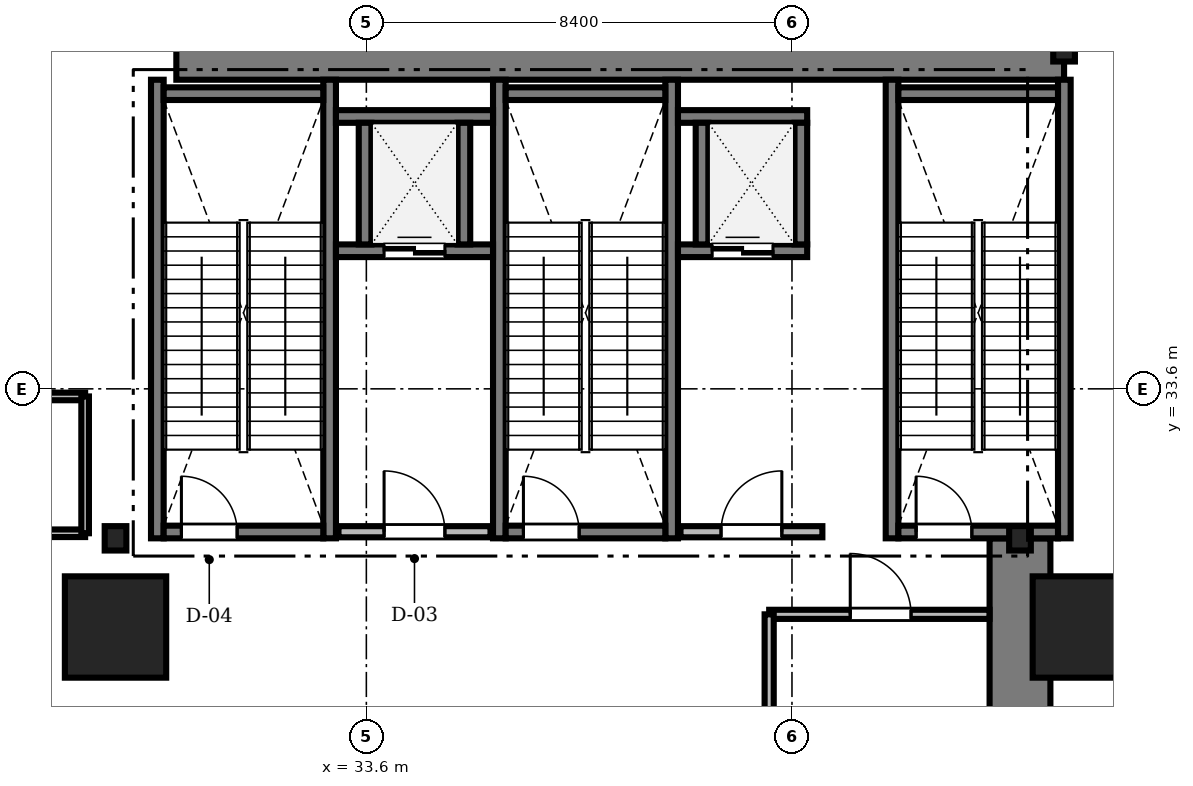
"""IFC4 building model, lengths in metres.
Left out: names, types, materials, properties, quantities, classifications, styles, units other than length and angle.
Written with IfcOpenShell. Run it as: python <this file> out.ifc"""

import sys

from ifc_helpers import new_model, si_unit, direction, frame, frame_2d, origin, origin_2d, place, context, subcontext, project, spatial, rectangle, i_section, extrude, source, transform, mapped, element, fill, save


model = new_model("IFC4")
c1 = context("Model", 3, precision=1e-05, world=origin(), true_north=direction((0.0, 1.0)))
c2 = subcontext(c1, "Body", "Model", "MODEL_VIEW")
j1 = project(units=[si_unit("LENGTHUNIT", "METRE"), si_unit("PLANEANGLEUNIT", "RADIAN")], contexts=[c1])
p1 = place(None, origin())
s1 = spatial("IfcSite", under=j1, at=p1, CompositionType="ELEMENT")
p2 = place(p1, origin())
s2 = spatial("IfcBuilding", under=s1, at=p2, CompositionType="ELEMENT")
p3 = place(p2, frame((0.0, 0.0, -6.0)))
s3 = spatial("IfcBuildingStorey", under=s2, at=p3, CompositionType="ELEMENT", Elevation=-6.0)
m1 = source(origin(), c2, "Body", "SweptSolid", [
    extrude(rectangle(XDim=17.52, YDim=1.2, at=frame_2d((8.76, 0.0))), origin(), (0.0, 0.0, 1.0), 5.6),
])
p4 = place(p3, frame((29.85, 40.3, 0.0), z_axis=(0.0, 0.0, 1.0), x_axis=(1.0, 0.0, 0.0)))
e1 = element("IfcWall", 1, at=p4, inside=s3, PredefinedType="SHEAR", context=c2, shape_type="MappedRepresentation", body=[
    mapped(m1, transform((0.0, 0.0, 0.0), scale=1.0)),
])
m2 = source(origin(), c2, "Body", "SweptSolid", [
    extrude(rectangle(XDim=13.15, YDim=1.2, at=frame_2d((6.575, 0.0))), origin(), (0.0, 0.0, 1.0), 5.6),
])
p5 = place(p3, frame((46.5, 17.5, 0.0), z_axis=(0.0, 0.0, 1.0), x_axis=(0.0, 1.0, 0.0)))
e2 = element("IfcWall", 2, at=p5, inside=s3, PredefinedType="SHEAR", context=c2, shape_type="MappedRepresentation", body=[
    mapped(m2, transform((0.0, 0.0, 0.0), scale=1.0)),
])
m3 = source(origin(), c2, "Body", "SweptSolid", [
    extrude(i_section(OverallWidth=0.428, OverallDepth=0.481, WebThickness=0.04, FlangeThickness=0.063, FilletRadius=0.015, at=origin_2d()), origin(), (0.0, 0.0, 1.0), 5.6),
])
for number, where, z_axis, x_axis in (
    (3, (28.65, 30.65, 0.0), (0.0, 0.0, 1.0), (1.0, 0.0, 0.0)),
    (4, (46.5, 30.65, 0.0), (0.0, 0.0, 1.0), (1.0, 0.0, 0.0)),
    (5, (47.37, 40.3, 0.0), (0.0, 0.0, 1.0), (1.0, 0.0, 0.0)),
):
    element("IfcColumn", number, at=place(p3, frame(where, z_axis=z_axis, x_axis=x_axis)), inside=s3, PredefinedType="COLUMN", context=c2, shape_type="MappedRepresentation", body=[
        mapped(m3, transform((0.0, 0.0, 0.0), scale=1.0)),
    ])
m4 = source(origin(), c2, "Body", "SweptSolid", [
    extrude(rectangle(XDim=2.0, YDim=2.0, at=origin_2d()), origin(), (0.0, 0.0, 1.0), 5.6),
])
for number, where, z_axis, x_axis in (
    (6, (28.65, 28.9, 0.0), (0.0, 0.0, 1.0), (1.0, 0.0, 0.0)),
    (7, (47.75, 28.9, 0.0), (0.0, 0.0, 1.0), (1.0, 0.0, 0.0)),
):
    element("IfcColumn", number, at=place(p3, frame(where, z_axis=z_axis, x_axis=x_axis)), inside=s3, PredefinedType="COLUMN", context=c2, shape_type="MappedRepresentation", body=[
        mapped(m4, transform((0.0, 0.0, 0.0), scale=1.0)),
    ])
m5 = source(origin(), c2, "Body", "SweptSolid", [
    extrude(rectangle(XDim=9.05, YDim=0.25, at=frame_2d((4.525, 0.0))), origin(), (0.0, 0.0, 1.0), 5.8),
])
for number, where, z_axis, x_axis in (
    (8, (29.475, 30.65, 0.0), (0.0, 0.0, 1.0), (0.0, 1.0, 0.0)),
    (9, (32.875, 30.65, 0.0), (0.0, 0.0, 1.0), (0.0, 1.0, 0.0)),
):
    element("IfcWall", number, at=place(p3, frame(where, z_axis=z_axis, x_axis=x_axis)), inside=s3, PredefinedType="SOLIDWALL", context=c2, shape_type="MappedRepresentation", body=[
        mapped(m5, transform((0.0, 0.0, 0.0), scale=1.0)),
    ])
m6 = source(origin(), c2, "Body", "SweptSolid", [
    extrude(rectangle(XDim=3.15, YDim=0.25, at=frame_2d((1.575, 0.0))), origin(), (0.0, 0.0, 1.0), 5.8),
])
p6 = place(p3, frame((29.6, 39.425, 0.0), z_axis=(0.0, 0.0, 1.0), x_axis=(1.0, 0.0, 0.0)))
e10 = element("IfcWall", 10, at=p6, inside=s3, PredefinedType="SOLIDWALL", context=c2, shape_type="MappedRepresentation", body=[
    mapped(m6, transform((0.0, 0.0, 0.0), scale=1.0)),
])
p7 = place(p3, frame((29.6, 30.775, 0.0), z_axis=(0.0, 0.0, 1.0), x_axis=(1.0, 0.0, 0.0)))
e11 = element("IfcWall", 11, at=p7, inside=s3, PredefinedType="SOLIDWALL", context=c2, shape_type="MappedRepresentation", body=[
    mapped(m6, transform((0.0, 0.0, 0.0), scale=1.0)),
])
m7 = source(origin(), c2, "Body", "SweptSolid", [
    extrude(rectangle(XDim=1.1, YDim=2.2, at=frame_2d((0.55, 1.1))), frame((0.0, 0.135, 0.0), z_axis=(0.0, -1.0, 0.0), x_axis=(1.0, 0.0, 0.0)), (0.0, 0.0, 1.0), 0.27),
])
p8 = place(p7, frame((0.35, 0.0, 0.0)))
e12 = element("IfcOpeningElement", 12, at=p8, cuts=e11, PredefinedType="OPENING", context=c2, shape_type="MappedRepresentation", body=[
    mapped(m7, transform((0.0, 0.0, 0.0), scale=1.0)),
])
for number, where, z_axis, x_axis in (
    (13, (36.225, 30.65, 0.0), (0.0, 0.0, 1.0), (0.0, 1.0, 0.0)),
    (14, (39.625, 30.65, 0.0), (0.0, 0.0, 1.0), (0.0, 1.0, 0.0)),
):
    element("IfcWall", number, at=place(p3, frame(where, z_axis=z_axis, x_axis=x_axis)), inside=s3, PredefinedType="SOLIDWALL", context=c2, shape_type="MappedRepresentation", body=[
        mapped(m5, transform((0.0, 0.0, 0.0), scale=1.0)),
    ])
p9 = place(p3, frame((36.35, 39.425, 0.0), z_axis=(0.0, 0.0, 1.0), x_axis=(1.0, 0.0, 0.0)))
e15 = element("IfcWall", 15, at=p9, inside=s3, PredefinedType="SOLIDWALL", context=c2, shape_type="MappedRepresentation", body=[
    mapped(m6, transform((0.0, 0.0, 0.0), scale=1.0)),
])
p10 = place(p3, frame((36.35, 30.775, 0.0), z_axis=(0.0, 0.0, 1.0), x_axis=(1.0, 0.0, 0.0)))
e16 = element("IfcWall", 16, at=p10, inside=s3, PredefinedType="SOLIDWALL", context=c2, shape_type="MappedRepresentation", body=[
    mapped(m6, transform((0.0, 0.0, 0.0), scale=1.0)),
])
p11 = place(p10, frame((0.35, 0.0, 0.0)))
e17 = element("IfcOpeningElement", 17, at=p11, cuts=e16, PredefinedType="OPENING", context=c2, shape_type="MappedRepresentation", body=[
    mapped(m7, transform((0.0, 0.0, 0.0), scale=1.0)),
])
for number, where, z_axis, x_axis in (
    (18, (43.975, 30.65, 0.0), (0.0, 0.0, 1.0), (0.0, 1.0, 0.0)),
    (19, (47.375, 30.65, 0.0), (0.0, 0.0, 1.0), (0.0, 1.0, 0.0)),
):
    element("IfcWall", number, at=place(p3, frame(where, z_axis=z_axis, x_axis=x_axis)), inside=s3, PredefinedType="SOLIDWALL", context=c2, shape_type="MappedRepresentation", body=[
        mapped(m5, transform((0.0, 0.0, 0.0), scale=1.0)),
    ])
p12 = place(p3, frame((44.1, 39.425, 0.0), z_axis=(0.0, 0.0, 1.0), x_axis=(1.0, 0.0, 0.0)))
e20 = element("IfcWall", 20, at=p12, inside=s3, PredefinedType="SOLIDWALL", context=c2, shape_type="MappedRepresentation", body=[
    mapped(m6, transform((0.0, 0.0, 0.0), scale=1.0)),
])
p13 = place(p3, frame((44.1, 30.775, 0.0), z_axis=(0.0, 0.0, 1.0), x_axis=(1.0, 0.0, 0.0)))
e21 = element("IfcWall", 21, at=p13, inside=s3, PredefinedType="SOLIDWALL", context=c2, shape_type="MappedRepresentation", body=[
    mapped(m6, transform((0.0, 0.0, 0.0), scale=1.0)),
])
p14 = place(p13, frame((0.35, 0.0, 0.0)))
e22 = element("IfcOpeningElement", 22, at=p14, cuts=e21, PredefinedType="OPENING", context=c2, shape_type="MappedRepresentation", body=[
    mapped(m7, transform((0.0, 0.0, 0.0), scale=1.0)),
])
m8 = source(origin(), c2, "Body", "SweptSolid", [
    extrude(rectangle(XDim=3.0, YDim=0.22, at=frame_2d((1.5, 0.0))), origin(), (0.0, 0.0, 1.0), 5.6),
])
p15 = place(p3, frame((33.05, 30.78, 0.0), z_axis=(0.0, 0.0, 1.0), x_axis=(1.0, 0.0, 0.0)))
e23 = element("IfcWall", 23, at=p15, inside=s3, PredefinedType="SOLIDWALL", context=c2, shape_type="MappedRepresentation", body=[
    mapped(m8, transform((0.0, 0.0, 0.0), scale=1.0)),
])
m9 = source(origin(), c2, "Body", "SweptSolid", [
    extrude(rectangle(XDim=1.2, YDim=2.2, at=frame_2d((0.6, 1.1))), frame((0.0, 0.12, 0.0), z_axis=(0.0, -1.0, 0.0), x_axis=(1.0, 0.0, 0.0)), (0.0, 0.0, 1.0), 0.24),
])
p16 = place(p15, frame((0.9, 0.0, 0.0)))
e24 = element("IfcOpeningElement", 24, at=p16, cuts=e23, PredefinedType="OPENING", context=c2, shape_type="MappedRepresentation", body=[
    mapped(m9, transform((0.0, 0.0, 0.0), scale=1.0)),
])
m10 = source(origin(), c2, "Body", "SweptSolid", [
    extrude(rectangle(XDim=2.8, YDim=0.22, at=frame_2d((1.4, 0.0))), origin(), (0.0, 0.0, 1.0), 5.6),
])
p17 = place(p3, frame((39.8, 30.78, 0.0), z_axis=(0.0, 0.0, 1.0), x_axis=(1.0, 0.0, 0.0)))
e25 = element("IfcWall", 25, at=p17, inside=s3, PredefinedType="SOLIDWALL", context=c2, shape_type="MappedRepresentation", body=[
    mapped(m10, transform((0.0, 0.0, 0.0), scale=1.0)),
])
p18 = place(p17, frame((0.8, 0.0, 0.0)))
e26 = element("IfcOpeningElement", 26, at=p18, cuts=e25, PredefinedType="OPENING", context=c2, shape_type="MappedRepresentation", body=[
    mapped(m9, transform((0.0, 0.0, 0.0), scale=1.0)),
])
m11 = source(origin(), c2, "Body", "SweptSolid", [
    extrude(rectangle(XDim=3.1, YDim=0.25, at=frame_2d((1.55, 0.0))), origin(), (0.0, 0.0, 1.0), 5.6),
])
p19 = place(p3, frame((33.0, 36.325, 0.0), z_axis=(0.0, 0.0, 1.0), x_axis=(1.0, 0.0, 0.0)))
e27 = element("IfcWall", 27, at=p19, inside=s3, PredefinedType="SOLIDWALL", context=c2, shape_type="MappedRepresentation", body=[
    mapped(m11, transform((0.0, 0.0, 0.0), scale=1.0)),
])
m12 = source(origin(), c2, "Body", "SweptSolid", [
    extrude(rectangle(XDim=1.2, YDim=2.25, at=frame_2d((0.6, 1.125))), frame((0.0, 0.135, 0.0), z_axis=(0.0, -1.0, 0.0), x_axis=(1.0, 0.0, 0.0)), (0.0, 0.0, 1.0), 0.27),
])
p20 = place(p19, frame((0.95, 0.0, 0.0)))
e28 = element("IfcOpeningElement", 28, at=p20, cuts=e27, PredefinedType="OPENING", context=c2, shape_type="MappedRepresentation", body=[
    mapped(m12, transform((0.0, 0.0, 0.0), scale=1.0)),
])
p21 = place(p3, frame((33.0, 38.975, 0.0), z_axis=(0.0, 0.0, 1.0), x_axis=(1.0, 0.0, 0.0)))
e29 = element("IfcWall", 29, at=p21, inside=s3, PredefinedType="SOLIDWALL", context=c2, shape_type="MappedRepresentation", body=[
    mapped(m11, transform((0.0, 0.0, 0.0), scale=1.0)),
])
m13 = source(origin(), c2, "Body", "SweptSolid", [
    extrude(rectangle(XDim=2.4, YDim=0.25, at=frame_2d((1.2, 0.0))), origin(), (0.0, 0.0, 1.0), 5.6),
])
for number, where, z_axis, x_axis in (
    (30, (33.575, 36.45, 0.0), (0.0, 0.0, 1.0), (0.0, 1.0, 0.0)),
    (31, (35.525, 36.45, 0.0), (0.0, 0.0, 1.0), (0.0, 1.0, 0.0)),
):
    element("IfcWall", number, at=place(p3, frame(where, z_axis=z_axis, x_axis=x_axis)), inside=s3, PredefinedType="SOLIDWALL", context=c2, shape_type="MappedRepresentation", body=[
        mapped(m13, transform((0.0, 0.0, 0.0), scale=1.0)),
    ])
m14 = source(origin(), c2, "Body", "SweptSolid", [
    extrude(rectangle(XDim=2.55, YDim=0.25, at=frame_2d((1.275, 0.0))), origin(), (0.0, 0.0, 1.0), 5.6),
])
p22 = place(p3, frame((39.75, 36.325, 0.0), z_axis=(0.0, 0.0, 1.0), x_axis=(1.0, 0.0, 0.0)))
e32 = element("IfcWall", 32, at=p22, inside=s3, PredefinedType="SOLIDWALL", context=c2, shape_type="MappedRepresentation", body=[
    mapped(m14, transform((0.0, 0.0, 0.0), scale=1.0)),
])
p23 = place(p22, frame((0.675, 0.0, 0.0)))
e33 = element("IfcOpeningElement", 33, at=p23, cuts=e32, PredefinedType="OPENING", context=c2, shape_type="MappedRepresentation", body=[
    mapped(m12, transform((0.0, 0.0, 0.0), scale=1.0)),
])
p24 = place(p3, frame((39.75, 38.975, 0.0), z_axis=(0.0, 0.0, 1.0), x_axis=(1.0, 0.0, 0.0)))
e34 = element("IfcWall", 34, at=p24, inside=s3, PredefinedType="SOLIDWALL", context=c2, shape_type="MappedRepresentation", body=[
    mapped(m14, transform((0.0, 0.0, 0.0), scale=1.0)),
])
for number, where, z_axis, x_axis in (
    (35, (40.225, 36.45, 0.0), (0.0, 0.0, 1.0), (0.0, 1.0, 0.0)),
    (36, (42.175, 36.45, 0.0), (0.0, 0.0, 1.0), (0.0, 1.0, 0.0)),
):
    element("IfcWall", number, at=place(p3, frame(where, z_axis=z_axis, x_axis=x_axis)), inside=s3, PredefinedType="SOLIDWALL", context=c2, shape_type="MappedRepresentation", body=[
        mapped(m13, transform((0.0, 0.0, 0.0), scale=1.0)),
    ])
m15 = source(origin(), c2, "Body", "SweptSolid", [
    extrude(rectangle(XDim=4.348, YDim=0.18, at=frame_2d((2.174, 0.0))), origin(), (0.0, 0.0, 1.0), 5.6),
])
p25 = place(p3, frame((41.55, 29.15, 0.0), z_axis=(0.0, 0.0, 1.0), x_axis=(1.0, 0.0, 0.0)))
e37 = element("IfcWall", 37, at=p25, inside=s3, PredefinedType="PARTITIONING", context=c2, shape_type="MappedRepresentation", body=[
    mapped(m15, transform((0.0, 0.0, 0.0), scale=1.0)),
])
m16 = source(origin(), c2, "Body", "SweptSolid", [
    extrude(rectangle(XDim=1.2, YDim=2.2, at=frame_2d((0.6, 1.1))), frame((0.0, 0.1, 0.0), z_axis=(0.0, -1.0, 0.0), x_axis=(1.0, 0.0, 0.0)), (0.0, 0.0, 1.0), 0.2),
])
p26 = place(p25, frame((1.6, 0.0, 0.0)))
e38 = element("IfcOpeningElement", 38, at=p26, cuts=e37, PredefinedType="OPENING", context=c2, shape_type="MappedRepresentation", body=[
    mapped(m16, transform((0.0, 0.0, 0.0), scale=1.0)),
])
m17 = source(origin(), c2, "Body", "SweptSolid", [
    extrude(rectangle(XDim=3.95, YDim=0.15, at=frame_2d((1.975, 0.0))), origin(), (0.0, 0.0, 1.0), 5.6),
])
p27 = place(p3, frame((24.1, 30.75, 0.0), z_axis=(0.0, 0.0, 1.0), x_axis=(1.0, 0.0, 0.0)))
e39 = element("IfcWall", 39, at=p27, inside=s3, PredefinedType="PARTITIONING", context=c2, shape_type="MappedRepresentation", body=[
    mapped(m17, transform((0.0, 0.0, 0.0), scale=1.0)),
])
m18 = source(origin(), c2, "Body", "SweptSolid", [
    extrude(rectangle(XDim=0.92, YDim=2.1, at=frame_2d((0.46, 1.05))), frame((0.0, 0.085, 0.0), z_axis=(0.0, -1.0, 0.0), x_axis=(1.0, 0.0, 0.0)), (0.0, 0.0, 1.0), 0.17),
])
p28 = place(p27, frame((1.1, 0.0, 0.0)))
e40 = element("IfcOpeningElement", 40, at=p28, cuts=e39, PredefinedType="OPENING", context=c2, shape_type="MappedRepresentation", body=[
    mapped(m18, transform((0.0, 0.0, 0.0), scale=1.0)),
])
p29 = place(p3, frame((24.1, 33.45, 0.0), z_axis=(0.0, 0.0, 1.0), x_axis=(1.0, 0.0, 0.0)))
e41 = element("IfcWall", 41, at=p29, inside=s3, PredefinedType="PARTITIONING", context=c2, shape_type="MappedRepresentation", body=[
    mapped(m17, transform((0.0, 0.0, 0.0), scale=1.0)),
])
m19 = source(origin(), c2, "Body", "SweptSolid", [
    extrude(rectangle(XDim=2.7, YDim=0.15, at=frame_2d((1.35, 0.0))), origin(), (0.0, 0.0, 1.0), 5.6),
])
p30 = place(p3, frame((28.05, 30.75, 0.0), z_axis=(0.0, 0.0, 1.0), x_axis=(0.0, 1.0, 0.0)))
e42 = element("IfcWall", 42, at=p30, inside=s3, PredefinedType="PARTITIONING", context=c2, shape_type="MappedRepresentation", body=[
    mapped(m19, transform((0.0, 0.0, 0.0), scale=1.0)),
])
m20 = source(origin(), c2, "Body", "SweptSolid", [
    extrude(rectangle(XDim=2.35, YDim=0.18, at=frame_2d((1.175, 0.0))), origin(), (0.0, 0.0, 1.0), 5.6),
])
p31 = place(p3, frame((41.55, 26.8, 0.0), z_axis=(0.0, 0.0, 1.0), x_axis=(0.0, 1.0, 0.0)))
e43 = element("IfcWall", 43, at=p31, inside=s3, PredefinedType="PARTITIONING", context=c2, shape_type="MappedRepresentation", body=[
    mapped(m20, transform((0.0, 0.0, 0.0), scale=1.0)),
])
m21 = source(origin(), c2, "Body", "SweptSolid", [
    extrude(rectangle(XDim=1.1, YDim=2.2, at=frame_2d((0.55, 1.1))), frame((0.0, 0.025, 0.0), z_axis=(0.0, -1.0, 0.0), x_axis=(1.0, 0.0, 0.0)), (0.0, 0.0, 1.0), 0.05),
])
p32 = place(p8, origin())
e44 = element("IfcDoor", 44, at=p32, inside=s3, OperationType="SINGLE_SWING_LEFT", PredefinedType="DOOR", context=c2, shape_type="MappedRepresentation", body=[
    mapped(m21, transform((0.0, 0.0, 0.0), scale=1.0)),
])
fill(e12, e44)
p33 = place(p11, origin())
e45 = element("IfcDoor", 45, at=p33, inside=s3, OperationType="SINGLE_SWING_LEFT", PredefinedType="DOOR", context=c2, shape_type="MappedRepresentation", body=[
    mapped(m21, transform((0.0, 0.0, 0.0), scale=1.0)),
])
fill(e17, e45)
p34 = place(p14, origin())
e46 = element("IfcDoor", 46, at=p34, inside=s3, OperationType="SINGLE_SWING_LEFT", PredefinedType="DOOR", context=c2, shape_type="MappedRepresentation", body=[
    mapped(m21, transform((0.0, 0.0, 0.0), scale=1.0)),
])
fill(e22, e46)
m22 = source(origin(), c2, "Body", "SweptSolid", [
    extrude(rectangle(XDim=1.2, YDim=2.2, at=frame_2d((0.6, 1.1))), frame((0.0, 0.025, 0.0), z_axis=(0.0, -1.0, 0.0), x_axis=(1.0, 0.0, 0.0)), (0.0, 0.0, 1.0), 0.05),
])
p35 = place(p16, origin())
e47 = element("IfcDoor", 47, at=p35, inside=s3, OperationType="SINGLE_SWING_LEFT", PredefinedType="DOOR", context=c2, shape_type="MappedRepresentation", body=[
    mapped(m22, transform((0.0, 0.0, 0.0), scale=1.0)),
])
fill(e24, e47)
p36 = place(p18, origin())
e48 = element("IfcDoor", 48, at=p36, inside=s3, OperationType="SINGLE_SWING_RIGHT", PredefinedType="DOOR", context=c2, shape_type="MappedRepresentation", body=[
    mapped(m22, transform((0.0, 0.0, 0.0), scale=1.0)),
])
fill(e26, e48)
m23 = source(origin(), c2, "Body", "SweptSolid", [
    extrude(rectangle(XDim=1.2, YDim=2.25, at=frame_2d((0.6, 1.125))), frame((0.0, 0.025, 0.0), z_axis=(0.0, -1.0, 0.0), x_axis=(1.0, 0.0, 0.0)), (0.0, 0.0, 1.0), 0.05),
])
p37 = place(p20, origin())
e49 = element("IfcDoor", 49, at=p37, inside=s3, OperationType="DOUBLE_DOOR_SLIDING", PredefinedType="DOOR", context=c2, shape_type="MappedRepresentation", body=[
    mapped(m23, transform((0.0, 0.0, 0.0), scale=1.0)),
])
fill(e28, e49)
p38 = place(p23, origin())
e50 = element("IfcDoor", 50, at=p38, inside=s3, OperationType="DOUBLE_DOOR_SLIDING", PredefinedType="DOOR", context=c2, shape_type="MappedRepresentation", body=[
    mapped(m23, transform((0.0, 0.0, 0.0), scale=1.0)),
])
fill(e33, e50)
p39 = place(p26, origin())
e51 = element("IfcDoor", 51, at=p39, inside=s3, OperationType="SINGLE_SWING_LEFT", PredefinedType="DOOR", context=c2, shape_type="MappedRepresentation", body=[
    mapped(m22, transform((0.0, 0.0, 0.0), scale=1.0)),
])
fill(e38, e51)
save(model, sys.argv[1])
